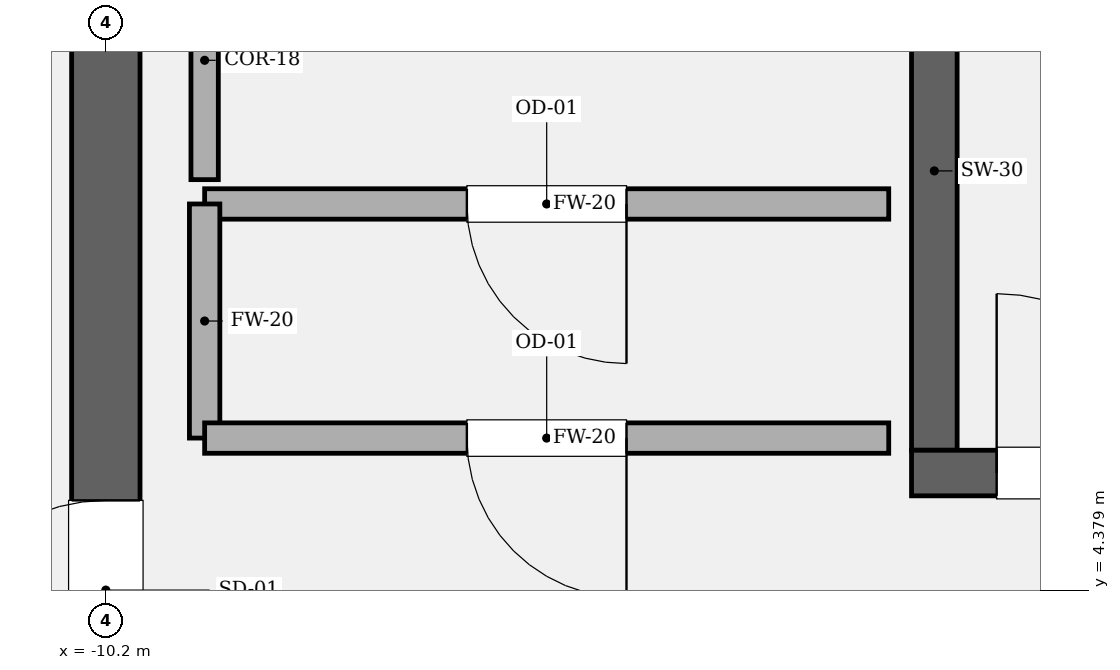
"""IFC4 building model, lengths in metres.
Left out: names, types, materials, properties, quantities, classifications, styles, units other than length and angle.
Written with IfcOpenShell. Run it as: python <this file> out.ifc"""

import sys

from ifc_helpers import new_model, si_unit, direction, frame, frame_2d, origin, place, context, subcontext, project, spatial, rectangle, extrude, element, fill, save


model = new_model("IFC4")
c1 = context("Model", 3, precision=1e-05, world=origin(), true_north=direction((0.0, 1.0)))
c2 = subcontext(c1, "Body", "Model", "MODEL_VIEW")
j1 = project(units=[si_unit("LENGTHUNIT", "METRE"), si_unit("PLANEANGLEUNIT", "RADIAN")], contexts=[c1])
p1 = place(None, origin())
s1 = spatial("IfcSite", under=j1, at=p1, CompositionType="ELEMENT")
p2 = place(p1, origin())
s2 = spatial("IfcBuilding", under=s1, at=p2, CompositionType="ELEMENT")
p3 = place(p2, frame((0.0, 0.0, 317.4)))
s3 = spatial("IfcBuildingStorey", under=s2, at=p3, CompositionType="ELEMENT", Elevation=317.4)
p4 = place(p3, frame((-10.2, -8.975, 0.0), z_axis=(0.0, 0.0, 1.0), x_axis=(0.0, 1.0, 0.0)))
e1 = element("IfcWall", 1, at=p4, inside=s3, PredefinedType="SHEAR", context=c2, shape_type="SweptSolid", body=[
    extrude(rectangle(XDim=17.95, YDim=0.45, at=frame_2d((8.975, 0.0))), origin(), (0.0, 0.0, 1.0), 4.2),
])
p5 = place(p4, frame((12.765, 0.0, 0.0)))
e2 = element("IfcOpeningElement", 2, at=p5, cuts=e1, PredefinedType="OPENING", context=c2, shape_type="SweptSolid", body=[
    extrude(rectangle(XDim=1.18, YDim=2.2, at=frame_2d((0.59, 1.1))), frame((0.0, 0.235, 0.0), z_axis=(0.0, -1.0, 0.0), x_axis=(1.0, 0.0, 0.0)), (0.0, 0.0, 1.0), 0.47),
])
p6 = place(p3, frame((-4.75, 5.3, 0.0), z_axis=(0.0, 0.0, 1.0), x_axis=(0.0, 1.0, 0.0)))
e3 = element("IfcWall", 3, at=p6, inside=s3, PredefinedType="SOLIDWALL", context=c2, shape_type="SweptSolid", body=[
    extrude(rectangle(XDim=3.675, YDim=0.3, at=frame_2d((1.837, 0.0))), origin(), (0.0, 0.0, 1.0), 4.2),
])
p7 = place(p3, frame((-4.9, 5.15, 0.0), z_axis=(0.0, 0.0, 1.0), x_axis=(1.0, 0.0, 0.0)))
e4 = element("IfcWall", 4, at=p7, inside=s3, PredefinedType="SOLIDWALL", context=c2, shape_type="SweptSolid", body=[
    extrude(rectangle(XDim=9.8, YDim=0.3, at=frame_2d((4.9, 0.0))), origin(), (0.0, 0.0, 1.0), 4.2),
])
p8 = place(p7, frame((0.56, 0.0, 0.0)))
e5 = element("IfcOpeningElement", 5, at=p8, cuts=e4, PredefinedType="OPENING", context=c2, shape_type="SweptSolid", body=[
    extrude(rectangle(XDim=1.18, YDim=2.2, at=frame_2d((0.59, 1.1))), frame((0.0, 0.16, 0.0), z_axis=(0.0, -1.0, 0.0), x_axis=(1.0, 0.0, 0.0)), (0.0, 0.0, 1.0), 0.32),
])
p9 = place(p3, frame((-5.05, 6.92, 0.0), z_axis=(0.0, 0.0, 1.0), x_axis=(-1.0, 0.0, 0.0)))
e6 = element("IfcWall", 6, at=p9, inside=s3, PredefinedType="SOLIDWALL", context=c2, shape_type="SweptSolid", body=[
    extrude(rectangle(XDim=4.5, YDim=0.2, at=frame_2d((2.25, 0.0))), origin(), (0.0, 0.0, 1.0), 4.0),
])
p10 = place(p9, frame((1.725, 0.0, 0.0)))
e7 = element("IfcOpeningElement", 7, at=p10, cuts=e6, PredefinedType="OPENING", context=c2, shape_type="SweptSolid", body=[
    extrude(rectangle(XDim=1.05, YDim=2.2, at=frame_2d((0.525, 1.1))), frame((0.0, 0.11, 0.0), z_axis=(0.0, -1.0, 0.0), x_axis=(1.0, 0.0, 0.0)), (0.0, 0.0, 1.0), 0.22),
])
p11 = place(p3, frame((-9.55, 6.92, 0.0), z_axis=(0.0, 0.0, 1.0), x_axis=(0.0, -1.0, 0.0)))
e8 = element("IfcWall", 8, at=p11, inside=s3, PredefinedType="SOLIDWALL", context=c2, shape_type="SweptSolid", body=[
    extrude(rectangle(XDim=1.54, YDim=0.2, at=frame_2d((0.77, 0.0))), origin(), (0.0, 0.0, 1.0), 4.0),
])
p12 = place(p3, frame((-9.55, 5.38, 0.0), z_axis=(0.0, 0.0, 1.0), x_axis=(1.0, 0.0, 0.0)))
e9 = element("IfcWall", 9, at=p12, inside=s3, PredefinedType="SOLIDWALL", context=c2, shape_type="SweptSolid", body=[
    extrude(rectangle(XDim=4.5, YDim=0.2, at=frame_2d((2.25, 0.0))), origin(), (0.0, 0.0, 1.0), 4.0),
])
p13 = place(p12, frame((1.725, 0.0, 0.0)))
e10 = element("IfcOpeningElement", 10, at=p13, cuts=e9, PredefinedType="OPENING", context=c2, shape_type="SweptSolid", body=[
    extrude(rectangle(XDim=1.05, YDim=2.2, at=frame_2d((0.525, 1.1))), frame((0.0, 0.11, 0.0), z_axis=(0.0, -1.0, 0.0), x_axis=(1.0, 0.0, 0.0)), (0.0, 0.0, 1.0), 0.22),
])
p14 = place(p3, frame((-9.55, 8.65, 0.0), z_axis=(0.0, 0.0, 1.0), x_axis=(0.0, -1.0, 0.0)))
e11 = element("IfcWall", 11, at=p14, inside=s3, PredefinedType="PARTITIONING", context=c2, shape_type="SweptSolid", body=[
    extrude(rectangle(XDim=1.57, YDim=0.18, at=frame_2d((0.785, 0.0))), origin(), (0.0, 0.0, 1.0), 4.0),
])
p15 = place(p8, origin())
e12 = element("IfcDoor", 12, at=p15, inside=s3, OperationType="SINGLE_SWING_LEFT", PredefinedType="DOOR", context=c2, shape_type="SweptSolid", body=[
    extrude(rectangle(XDim=1.18, YDim=2.2, at=frame_2d((0.59, 1.1))), frame((0.0, 0.025, 0.0), z_axis=(0.0, -1.0, 0.0), x_axis=(1.0, 0.0, 0.0)), (0.0, 0.0, 1.0), 0.05),
])
fill(e5, e12)
p16 = place(p5, origin())
e13 = element("IfcDoor", 13, at=p16, inside=s3, OperationType="SINGLE_SWING_LEFT", PredefinedType="DOOR", context=c2, shape_type="SweptSolid", body=[
    extrude(rectangle(XDim=1.18, YDim=2.2, at=frame_2d((0.59, 1.1))), frame((0.0, 0.025, 0.0), z_axis=(0.0, -1.0, 0.0), x_axis=(1.0, 0.0, 0.0)), (0.0, 0.0, 1.0), 0.05),
])
fill(e2, e13)
p17 = place(p13, origin())
e14 = element("IfcDoor", 14, at=p17, inside=s3, OperationType="SINGLE_SWING_RIGHT", PredefinedType="DOOR", context=c2, shape_type="SweptSolid", body=[
    extrude(rectangle(XDim=1.05, YDim=2.2, at=frame_2d((0.525, 1.1))), frame((0.0, 0.025, 0.0), z_axis=(0.0, -1.0, 0.0), x_axis=(1.0, 0.0, 0.0)), (0.0, 0.0, 1.0), 0.05),
])
fill(e10, e14)
p18 = place(p10, origin())
e15 = element("IfcDoor", 15, at=p18, inside=s3, OperationType="SINGLE_SWING_LEFT", PredefinedType="DOOR", context=c2, shape_type="SweptSolid", body=[
    extrude(rectangle(XDim=1.05, YDim=2.2, at=frame_2d((0.525, 1.1))), frame((0.0, 0.025, 0.0), z_axis=(0.0, -1.0, 0.0), x_axis=(1.0, 0.0, 0.0)), (0.0, 0.0, 1.0), 0.05),
])
fill(e7, e15)
save(model, sys.argv[1])
